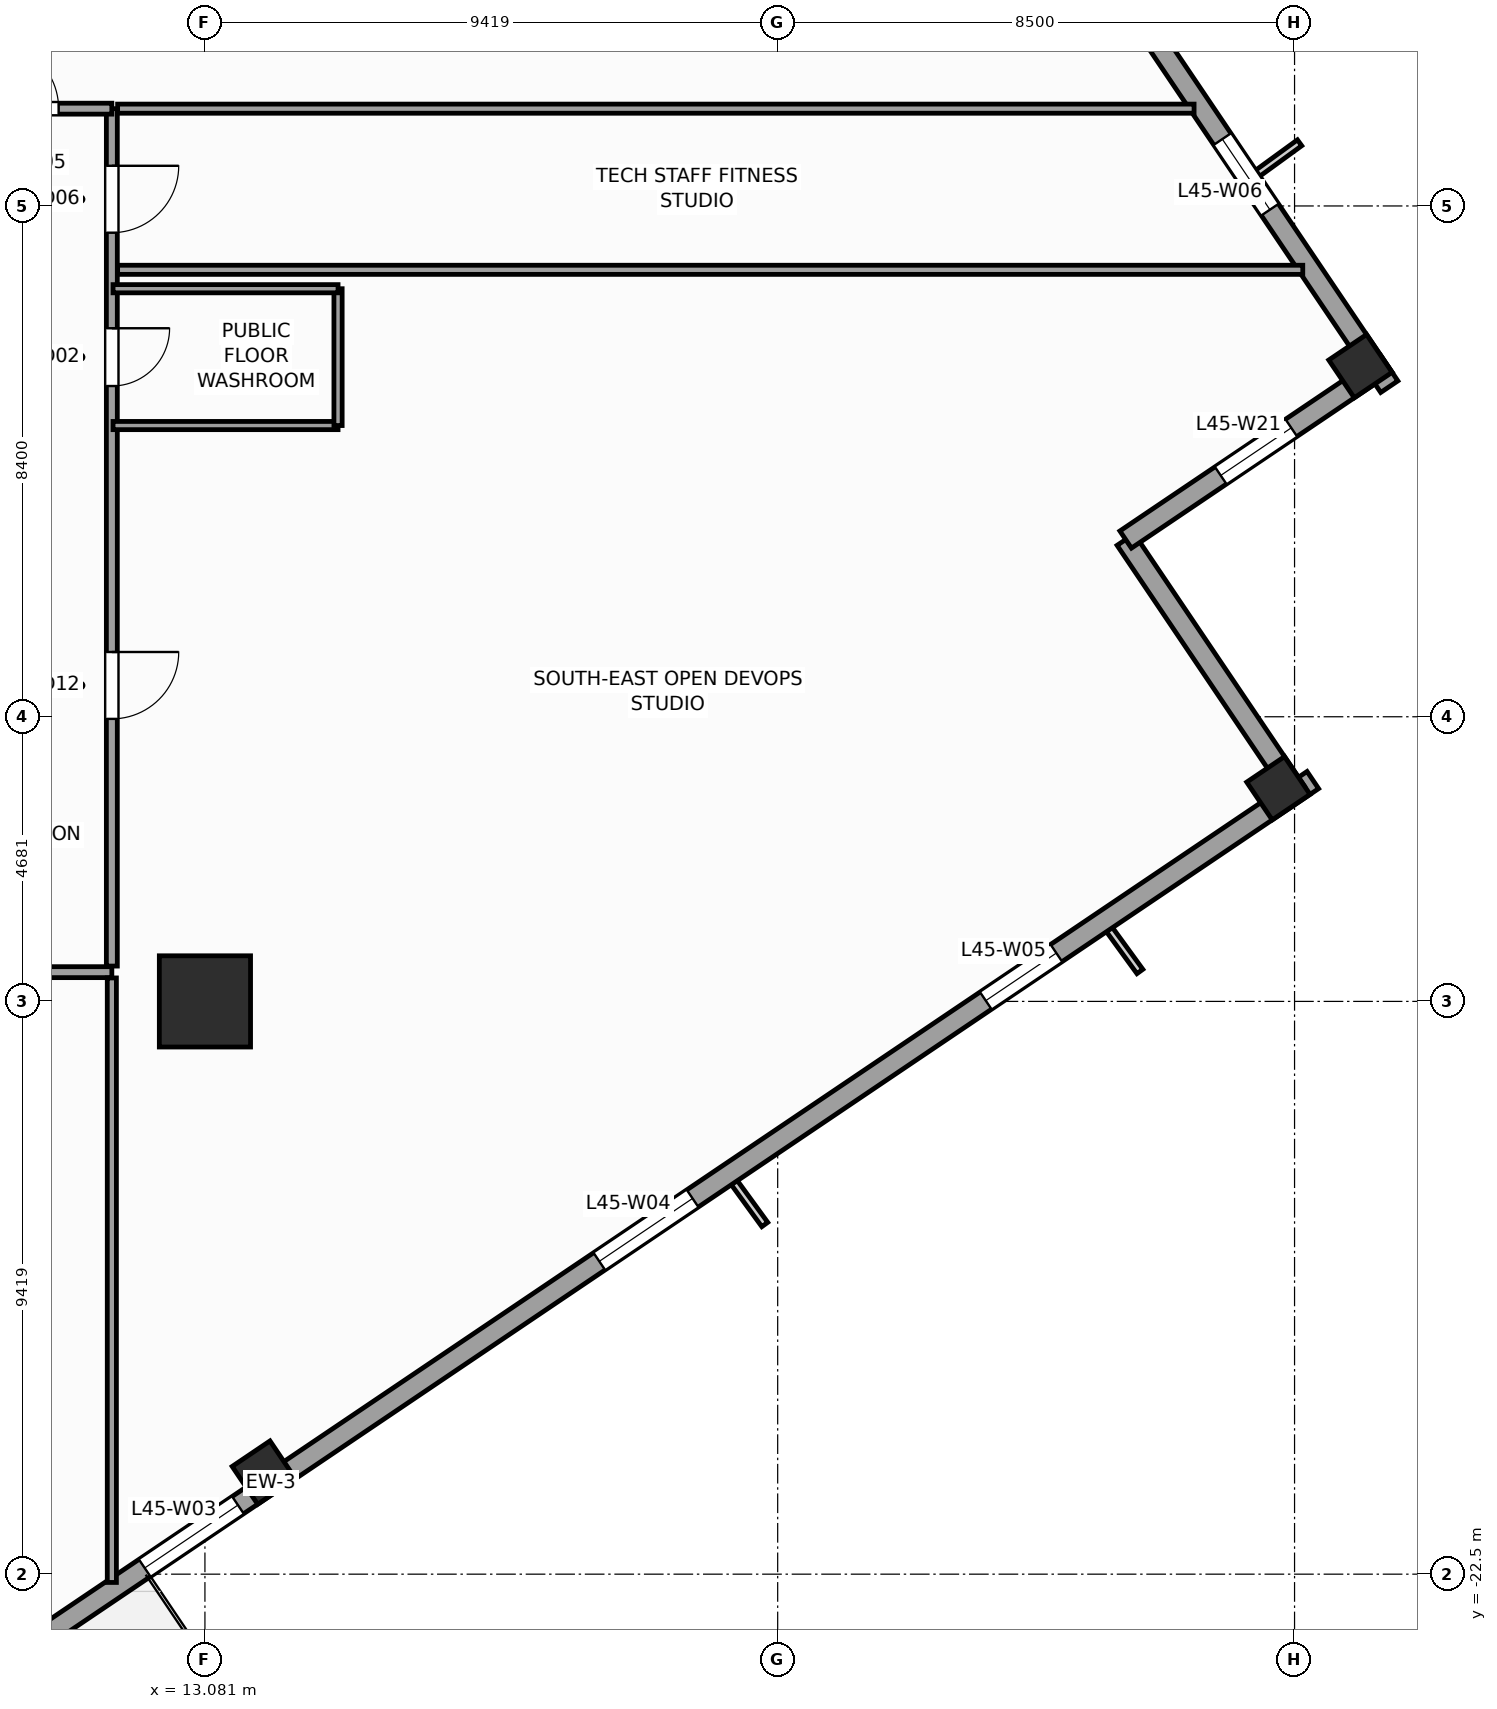
"""IFC4 building model, lengths in metres.
Left out: names, types, materials, properties, quantities, classifications, styles, units other than length and angle.
Written with IfcOpenShell. Run it as: python <this file> out.ifc"""

import sys

from ifc_helpers import new_model, si_unit, direction, frame, frame_2d, origin, origin_2d, place, context, subcontext, project, spatial, rectangle, extrude, source, transform, mapped, element, fill, save


model = new_model("IFC4")
c1 = context("Model", 3, precision=1e-05, world=origin(), true_north=direction((0.0, 1.0)))
c2 = subcontext(c1, "Body", "Model", "MODEL_VIEW")
j1 = project(units=[si_unit("LENGTHUNIT", "METRE"), si_unit("PLANEANGLEUNIT", "RADIAN")], contexts=[c1])
p1 = place(None, origin())
s1 = spatial("IfcSite", under=j1, at=p1, CompositionType="ELEMENT")
p2 = place(p1, origin())
s2 = spatial("IfcBuilding", under=s1, at=p2, CompositionType="ELEMENT")
p3 = place(p2, frame((0.0, 0.0, 188.4)))
s3 = spatial("IfcBuildingStorey", under=s2, at=p3, CompositionType="ELEMENT", Elevation=188.4)
m1 = source(origin(), c2, "Body", "SweptSolid", [
    extrude(rectangle(XDim=1.5, YDim=1.5, at=origin_2d()), origin(), (0.0, 0.0, 1.0), 4.0),
])
p4 = place(p3, frame((13.081, -13.081, 0.0), z_axis=(0.0, 0.0, 1.0), x_axis=(1.0, 0.0, 0.0)))
e1 = element("IfcColumn", 1, at=p4, inside=s3, PredefinedType="COLUMN", context=c2, shape_type="MappedRepresentation", body=[
    mapped(m1, transform((0.0, 0.0, 0.0), scale=1.0)),
])
m2 = source(origin(), c2, "Body", "SweptSolid", [
    extrude(rectangle(XDim=0.75, YDim=0.75, at=origin_2d()), origin(), (0.0, 0.0, 1.0), 4.0),
])
for number, where, z_axis, x_axis in (
    (2, (14.05, -20.83, 0.0), (0.0, 0.0, 1.0), (0.829, 0.559, 0.0)),
    (3, (30.734, -9.576, 0.0), (0.0, 0.0, 1.0), (0.829, 0.559, 0.0)),
    (4, (32.083, -2.635, 0.0), (0.0, 0.0, 1.0), (0.829, 0.559, 0.0)),
):
    element("IfcColumn", number, at=place(p3, frame(where, z_axis=z_axis, x_axis=x_axis)), inside=s3, PredefinedType="COLUMN", context=c2, shape_type="MappedRepresentation", body=[
        mapped(m2, transform((0.0, 0.0, 0.0), scale=1.0)),
    ])
p5 = place(p3, frame((-2.972, -32.558, 0.0), z_axis=(0.0, 0.0, 1.0), x_axis=(0.829036218961, 0.559194910251, 0.0)))
e5 = element("IfcWall", 5, at=p5, inside=s3, PredefinedType="STANDARD", context=c2, shape_type="SweptSolid", body=[
    extrude(rectangle(XDim=41.34, YDim=0.34, at=frame_2d((20.67, 0.0))), origin(), (0.0, 0.0, 1.0), 3.04),
])
p6 = place(p5, frame((14.545, 0.0, 0.0)))
e6 = element("IfcOpeningElement", 6, at=p6, cuts=e5, PredefinedType="OPENING", context=c2, shape_type="SweptSolid", body=[
    extrude(rectangle(XDim=1.05, YDim=2.25, at=frame_2d((0.525, 1.125))), frame((0.0, 0.18, 0.0), z_axis=(0.0, -1.0, 0.0), x_axis=(1.0, 0.0, 0.0)), (0.0, 0.0, 1.0), 0.36),
])
p7 = place(p5, frame((4.261, 0.0, 0.56)))
e7 = element("IfcOpeningElement", 7, at=p7, cuts=e5, PredefinedType="OPENING", context=c2, shape_type="SweptSolid", body=[
    extrude(rectangle(XDim=1.4, YDim=2.4, at=frame_2d((0.7, 1.2))), frame((0.0, 0.18, 0.0), z_axis=(0.0, -1.0, 0.0), x_axis=(1.0, 0.0, 0.0)), (0.0, 0.0, 1.0), 0.36),
])
p8 = place(p5, frame((11.064, 0.0, 0.61)))
e8 = element("IfcOpeningElement", 8, at=p8, cuts=e5, PredefinedType="OPENING", context=c2, shape_type="SweptSolid", body=[
    extrude(rectangle(XDim=1.85, YDim=2.35, at=frame_2d((0.925, 1.175))), frame((0.0, 0.18, 0.0), z_axis=(0.0, -1.0, 0.0), x_axis=(1.0, 0.0, 0.0)), (0.0, 0.0, 1.0), 0.36),
])
p9 = place(p5, frame((18.168, 0.0, 0.61)))
e9 = element("IfcOpeningElement", 9, at=p9, cuts=e5, PredefinedType="OPENING", context=c2, shape_type="SweptSolid", body=[
    extrude(rectangle(XDim=1.85, YDim=2.35, at=frame_2d((0.925, 1.175))), frame((0.0, 0.18, 0.0), z_axis=(0.0, -1.0, 0.0), x_axis=(1.0, 0.0, 0.0)), (0.0, 0.0, 1.0), 0.36),
])
p10 = place(p5, frame((27.186, 0.0, 0.61)))
e10 = element("IfcOpeningElement", 10, at=p10, cuts=e5, PredefinedType="OPENING", context=c2, shape_type="SweptSolid", body=[
    extrude(rectangle(XDim=1.85, YDim=2.35, at=frame_2d((0.925, 1.175))), frame((0.0, 0.18, 0.0), z_axis=(0.0, -1.0, 0.0), x_axis=(1.0, 0.0, 0.0)), (0.0, 0.0, 1.0), 0.36),
])
p11 = place(p5, frame((34.852, 0.0, 0.56)))
e11 = element("IfcOpeningElement", 11, at=p11, cuts=e5, PredefinedType="OPENING", context=c2, shape_type="SweptSolid", body=[
    extrude(rectangle(XDim=1.4, YDim=2.4, at=frame_2d((0.7, 1.2))), frame((0.0, 0.18, 0.0), z_axis=(0.0, -1.0, 0.0), x_axis=(1.0, 0.0, 0.0)), (0.0, 0.0, 1.0), 0.36),
])
p12 = place(p3, frame((31.019, -9.631, 0.0), z_axis=(0.0, 0.0, 1.0), x_axis=(-0.559210350234, 0.829025804298, 0.0)))
e12 = element("IfcWall", 12, at=p12, inside=s3, PredefinedType="STANDARD", context=c2, shape_type="SweptSolid", body=[
    extrude(rectangle(XDim=5.0, YDim=0.34, at=frame_2d((2.5, 0.0))), origin(), (0.0, 0.0, 1.0), 3.74),
])
p13 = place(p3, frame((28.223, -5.486, 0.0), z_axis=(0.0, 0.0, 1.0), x_axis=(0.82905227345, 0.559171107879, 0.0)))
e13 = element("IfcWall", 13, at=p13, inside=s3, PredefinedType="STANDARD", context=c2, shape_type="SweptSolid", body=[
    extrude(rectangle(XDim=5.17, YDim=0.34, at=frame_2d((2.585, 0.0))), origin(), (0.0, 0.0, 1.0), 3.04),
])
p14 = place(p13, frame((1.885, 0.0, 0.56)))
e14 = element("IfcOpeningElement", 14, at=p14, cuts=e13, PredefinedType="OPENING", context=c2, shape_type="SweptSolid", body=[
    extrude(rectangle(XDim=1.4, YDim=2.4, at=frame_2d((0.7, 1.2))), frame((0.0, 0.18, 0.0), z_axis=(0.0, -1.0, 0.0), x_axis=(1.0, 0.0, 0.0)), (0.0, 0.0, 1.0), 0.36),
])
p15 = place(p3, frame((32.558, -2.972, 0.0), z_axis=(0.0, 0.0, 1.0), x_axis=(-0.559194910251, 0.829036218961, 0.0)))
e15 = element("IfcWall", 15, at=p15, inside=s3, PredefinedType="STANDARD", context=c2, shape_type="SweptSolid", body=[
    extrude(rectangle(XDim=41.34, YDim=0.34, at=frame_2d((20.67, 0.0))), origin(), (0.0, 0.0, 1.0), 3.04),
])
p16 = place(p15, frame((3.511, 0.0, 0.56)))
e16 = element("IfcOpeningElement", 16, at=p16, cuts=e15, PredefinedType="OPENING", context=c2, shape_type="SweptSolid", body=[
    extrude(rectangle(XDim=1.4, YDim=2.4, at=frame_2d((0.7, 1.2))), frame((0.0, 0.18, 0.0), z_axis=(0.0, -1.0, 0.0), x_axis=(1.0, 0.0, 0.0)), (0.0, 0.0, 1.0), 0.36),
])
p17 = place(p15, frame((11.064, 0.0, 0.61)))
e17 = element("IfcOpeningElement", 17, at=p17, cuts=e15, PredefinedType="OPENING", context=c2, shape_type="SweptSolid", body=[
    extrude(rectangle(XDim=1.85, YDim=2.35, at=frame_2d((0.925, 1.175))), frame((0.0, 0.18, 0.0), z_axis=(0.0, -1.0, 0.0), x_axis=(1.0, 0.0, 0.0)), (0.0, 0.0, 1.0), 0.36),
])
p18 = place(p15, frame((18.168, 0.0, 0.61)))
e18 = element("IfcOpeningElement", 18, at=p18, cuts=e15, PredefinedType="OPENING", context=c2, shape_type="SweptSolid", body=[
    extrude(rectangle(XDim=1.85, YDim=2.35, at=frame_2d((0.925, 1.175))), frame((0.0, 0.18, 0.0), z_axis=(0.0, -1.0, 0.0), x_axis=(1.0, 0.0, 0.0)), (0.0, 0.0, 1.0), 0.36),
])
p19 = place(p15, frame((27.186, 0.0, 0.61)))
e19 = element("IfcOpeningElement", 19, at=p19, cuts=e15, PredefinedType="OPENING", context=c2, shape_type="SweptSolid", body=[
    extrude(rectangle(XDim=1.85, YDim=2.35, at=frame_2d((0.925, 1.175))), frame((0.0, 0.18, 0.0), z_axis=(0.0, -1.0, 0.0), x_axis=(1.0, 0.0, 0.0)), (0.0, 0.0, 1.0), 0.36),
])
p20 = place(p15, frame((34.852, 0.0, 0.56)))
e20 = element("IfcOpeningElement", 20, at=p20, cuts=e15, PredefinedType="OPENING", context=c2, shape_type="SweptSolid", body=[
    extrude(rectangle(XDim=1.4, YDim=2.4, at=frame_2d((0.7, 1.2))), frame((0.0, 0.18, 0.0), z_axis=(0.0, -1.0, 0.0), x_axis=(1.0, 0.0, 0.0)), (0.0, 0.0, 1.0), 0.36),
])
p21 = place(p3, frame((-10.45, -12.6, 0.0), z_axis=(0.0, 0.0, 1.0), x_axis=(1.0, 0.0, 0.0)))
e21 = element("IfcWall", 21, at=p21, inside=s3, PredefinedType="PARTITIONING", context=c2, shape_type="SweptSolid", body=[
    extrude(rectangle(XDim=22.0, YDim=0.18, at=frame_2d((11.0, 0.0))), origin(), (0.0, 0.0, 1.0), 3.74),
])
p22 = place(p21, frame((11.286, 0.0, 0.0)))
e22 = element("IfcOpeningElement", 22, at=p22, cuts=e21, PredefinedType="OPENING", context=c2, shape_type="SweptSolid", body=[
    extrude(rectangle(XDim=0.95, YDim=2.1, at=frame_2d((0.475, 1.05))), frame((0.0, 0.1, 0.0), z_axis=(0.0, -1.0, 0.0), x_axis=(1.0, 0.0, 0.0)), (0.0, 0.0, 1.0), 0.2),
])
p23 = place(p21, frame((4.839, 0.0, 0.0)))
e23 = element("IfcOpeningElement", 23, at=p23, cuts=e21, PredefinedType="OPENING", context=c2, shape_type="SweptSolid", body=[
    extrude(rectangle(XDim=1.1, YDim=2.2, at=frame_2d((0.55, 1.1))), frame((0.0, 0.1, 0.0), z_axis=(0.0, -1.0, 0.0), x_axis=(1.0, 0.0, 0.0)), (0.0, 0.0, 1.0), 0.2),
])
p24 = place(p21, frame((16.66, 0.0, 0.0)))
e24 = element("IfcOpeningElement", 24, at=p24, cuts=e21, PredefinedType="OPENING", context=c2, shape_type="SweptSolid", body=[
    extrude(rectangle(XDim=1.1, YDim=2.2, at=frame_2d((0.55, 1.1))), frame((0.0, 0.1, 0.0), z_axis=(0.0, -1.0, 0.0), x_axis=(1.0, 0.0, 0.0)), (0.0, 0.0, 1.0), 0.2),
])
p25 = place(p3, frame((11.55, -12.5, 0.0), z_axis=(0.0, 0.0, 1.0), x_axis=(0.0, 1.0, 0.0)))
e25 = element("IfcWall", 25, at=p25, inside=s3, PredefinedType="PARTITIONING", context=c2, shape_type="SweptSolid", body=[
    extrude(rectangle(XDim=14.1, YDim=0.18, at=frame_2d((7.05, 0.0))), origin(), (0.0, 0.0, 1.0), 3.74),
])
p26 = place(p25, frame((9.539, 0.0, 0.0)))
e26 = element("IfcOpeningElement", 26, at=p26, cuts=e25, PredefinedType="OPENING", context=c2, shape_type="SweptSolid", body=[
    extrude(rectangle(XDim=0.95, YDim=2.1, at=frame_2d((0.475, 1.05))), frame((0.0, 0.1, 0.0), z_axis=(0.0, -1.0, 0.0), x_axis=(1.0, 0.0, 0.0)), (0.0, 0.0, 1.0), 0.2),
])
p27 = place(p25, frame((12.061, 0.0, 0.0)))
e27 = element("IfcOpeningElement", 27, at=p27, cuts=e25, PredefinedType="OPENING", context=c2, shape_type="SweptSolid", body=[
    extrude(rectangle(XDim=1.1, YDim=2.2, at=frame_2d((0.55, 1.1))), frame((0.0, 0.1, 0.0), z_axis=(0.0, -1.0, 0.0), x_axis=(1.0, 0.0, 0.0)), (0.0, 0.0, 1.0), 0.2),
])
p28 = place(p25, frame((4.065, 0.0, 0.0)))
e28 = element("IfcOpeningElement", 28, at=p28, cuts=e25, PredefinedType="OPENING", context=c2, shape_type="SweptSolid", body=[
    extrude(rectangle(XDim=1.1, YDim=2.2, at=frame_2d((0.55, 1.1))), frame((0.0, 0.1, 0.0), z_axis=(0.0, -1.0, 0.0), x_axis=(1.0, 0.0, 0.0)), (0.0, 0.0, 1.0), 0.2),
])
p29 = place(p3, frame((8.7, 1.6, 0.0), z_axis=(0.0, 0.0, 1.0), x_axis=(1.0, 0.0, 0.0)))
e29 = element("IfcWall", 29, at=p29, inside=s3, PredefinedType="PARTITIONING", context=c2, shape_type="SweptSolid", body=[
    extrude(rectangle(XDim=2.85, YDim=0.18, at=frame_2d((1.425, 0.0))), origin(), (0.0, 0.0, 1.0), 3.74),
])
p30 = place(p29, frame((0.875, 0.0, 0.0)))
e30 = element("IfcOpeningElement", 30, at=p30, cuts=e29, PredefinedType="OPENING", context=c2, shape_type="SweptSolid", body=[
    extrude(rectangle(XDim=1.1, YDim=2.2, at=frame_2d((0.55, 1.1))), frame((0.0, 0.1, 0.0), z_axis=(0.0, -1.0, 0.0), x_axis=(1.0, 0.0, 0.0)), (0.0, 0.0, 1.0), 0.2),
])
p31 = place(p3, frame((11.645, -1.05, 0.0), z_axis=(0.0, 0.0, 1.0), x_axis=(1.0, 0.0, 0.0)))
e31 = element("IfcWall", 31, at=p31, inside=s3, PredefinedType="PARTITIONING", context=c2, shape_type="SweptSolid", body=[
    extrude(rectangle(XDim=19.49, YDim=0.15, at=frame_2d((9.745, 0.0))), origin(), (0.0, 0.0, 1.0), 3.74),
])
p32 = place(p3, frame((11.645, 1.6, 0.0), z_axis=(0.0, 0.0, 1.0), x_axis=(1.0, 0.0, 0.0)))
e32 = element("IfcWall", 32, at=p32, inside=s3, PredefinedType="PARTITIONING", context=c2, shape_type="SweptSolid", body=[
    extrude(rectangle(XDim=17.703, YDim=0.15, at=frame_2d((8.851, 0.0))), origin(), (0.0, 0.0, 1.0), 3.74),
])
p33 = place(p3, frame((11.55, -22.636, 0.0), z_axis=(0.0, 0.0, 1.0), x_axis=(0.0, 1.0, 0.0)))
e33 = element("IfcWall", 33, at=p33, inside=s3, PredefinedType="PARTITIONING", context=c2, shape_type="SweptSolid", body=[
    extrude(rectangle(XDim=9.941, YDim=0.15, at=frame_2d((4.971, 0.0))), origin(), (0.0, 0.0, 1.0), 3.74),
])
p34 = place(p3, frame((11.57, -3.611, 0.0), z_axis=(0.0, 0.0, 1.0), x_axis=(1.0, 0.0, 0.0)))
e34 = element("IfcWall", 34, at=p34, inside=s3, PredefinedType="PARTITIONING", context=c2, shape_type="SweptSolid", body=[
    extrude(rectangle(XDim=3.7, YDim=0.135, at=frame_2d((1.85, 0.0))), origin(), (0.0, 0.0, 1.0), 3.74),
])
p35 = place(p3, frame((15.27, -3.611, 0.0), z_axis=(0.0, 0.0, 1.0), x_axis=(0.0, 1.0, 0.0)))
e35 = element("IfcWall", 35, at=p35, inside=s3, PredefinedType="PARTITIONING", context=c2, shape_type="SweptSolid", body=[
    extrude(rectangle(XDim=2.25, YDim=0.135, at=frame_2d((1.125, 0.0))), origin(), (0.0, 0.0, 1.0), 3.24),
])
p36 = place(p3, frame((11.57, -1.361, 0.0), z_axis=(0.0, 0.0, 1.0), x_axis=(1.0, 0.0, 0.0)))
e36 = element("IfcWall", 36, at=p36, inside=s3, PredefinedType="PARTITIONING", context=c2, shape_type="SweptSolid", body=[
    extrude(rectangle(XDim=3.7, YDim=0.135, at=frame_2d((1.85, 0.0))), origin(), (0.0, 0.0, 1.0), 3.74),
])
m3 = source(origin(), c2, "Body", "SweptSolid", [
    extrude(rectangle(XDim=1.85, YDim=2.35, at=frame_2d((0.925, 1.175))), frame((0.0, 0.03, 0.0), z_axis=(0.0, -1.0, 0.0), x_axis=(1.0, 0.0, 0.0)), (0.0, 0.0, 1.0), 0.06),
])
p37 = place(p9, origin())
e37 = element("IfcWindow", 37, at=p37, inside=s3, PartitioningType="SINGLE_PANEL", PredefinedType="WINDOW", context=c2, shape_type="MappedRepresentation", body=[
    mapped(m3, transform((0.0, 0.0, 0.0), scale=1.0)),
])
fill(e9, e37)
p38 = place(p10, origin())
e38 = element("IfcWindow", 38, at=p38, inside=s3, PartitioningType="SINGLE_PANEL", PredefinedType="WINDOW", context=c2, shape_type="MappedRepresentation", body=[
    mapped(m3, transform((0.0, 0.0, 0.0), scale=1.0)),
])
fill(e10, e38)
m4 = source(origin(), c2, "Body", "SweptSolid", [
    extrude(rectangle(XDim=1.4, YDim=2.4, at=frame_2d((0.7, 1.2))), frame((0.0, 0.03, 0.0), z_axis=(0.0, -1.0, 0.0), x_axis=(1.0, 0.0, 0.0)), (0.0, 0.0, 1.0), 0.06),
])
p39 = place(p11, origin())
e39 = element("IfcWindow", 39, at=p39, inside=s3, PartitioningType="SINGLE_PANEL", PredefinedType="WINDOW", context=c2, shape_type="MappedRepresentation", body=[
    mapped(m4, transform((0.0, 0.0, 0.0), scale=1.0)),
])
fill(e11, e39)
p40 = place(p16, origin())
e40 = element("IfcWindow", 40, at=p40, inside=s3, PartitioningType="SINGLE_PANEL", PredefinedType="WINDOW", context=c2, shape_type="MappedRepresentation", body=[
    mapped(m4, transform((0.0, 0.0, 0.0), scale=1.0)),
])
fill(e16, e40)
p41 = place(p14, origin())
e41 = element("IfcWindow", 41, at=p41, inside=s3, PartitioningType="SINGLE_PANEL", PredefinedType="WINDOW", context=c2, shape_type="MappedRepresentation", body=[
    mapped(m4, transform((0.0, 0.0, 0.0), scale=1.0)),
])
fill(e14, e41)
m5 = source(origin(), c2, "Body", "SweptSolid", [
    extrude(rectangle(XDim=0.95, YDim=2.1, at=frame_2d((0.475, 1.05))), frame((0.0, 0.025, 0.0), z_axis=(0.0, -1.0, 0.0), x_axis=(1.0, 0.0, 0.0)), (0.0, 0.0, 1.0), 0.05),
])
p42 = place(p26, frame((0.95, 0.0, 0.0), z_axis=(0.0, 0.0, 1.0), x_axis=(-1.0, 0.0, 0.0)))
e42 = element("IfcDoor", 42, at=p42, inside=s3, OperationType="SINGLE_SWING_RIGHT", PredefinedType="DOOR", context=c2, shape_type="MappedRepresentation", body=[
    mapped(m5, transform((0.0, 0.0, 0.0), scale=1.0)),
])
fill(e26, e42)
m6 = source(origin(), c2, "Body", "SweptSolid", [
    extrude(rectangle(XDim=1.1, YDim=2.2, at=frame_2d((0.55, 1.1))), frame((0.0, 0.025, 0.0), z_axis=(0.0, -1.0, 0.0), x_axis=(1.0, 0.0, 0.0)), (0.0, 0.0, 1.0), 0.05),
])
p43 = place(p30, origin())
e43 = element("IfcDoor", 43, at=p43, inside=s3, OperationType="SINGLE_SWING_LEFT", PredefinedType="DOOR", context=c2, shape_type="MappedRepresentation", body=[
    mapped(m6, transform((0.0, 0.0, 0.0), scale=1.0)),
])
fill(e30, e43)
p44 = place(p27, frame((1.1, 0.0, 0.0), z_axis=(0.0, 0.0, 1.0), x_axis=(-1.0, 0.0, 0.0)))
e44 = element("IfcDoor", 44, at=p44, inside=s3, OperationType="SINGLE_SWING_RIGHT", PredefinedType="DOOR", context=c2, shape_type="MappedRepresentation", body=[
    mapped(m6, transform((0.0, 0.0, 0.0), scale=1.0)),
])
fill(e27, e44)
p45 = place(p28, frame((1.1, 0.0, 0.0), z_axis=(0.0, 0.0, 1.0), x_axis=(-1.0, 0.0, 0.0)))
e45 = element("IfcDoor", 45, at=p45, inside=s3, OperationType="SINGLE_SWING_RIGHT", PredefinedType="DOOR", context=c2, shape_type="MappedRepresentation", body=[
    mapped(m6, transform((0.0, 0.0, 0.0), scale=1.0)),
])
fill(e28, e45)
save(model, sys.argv[1])
